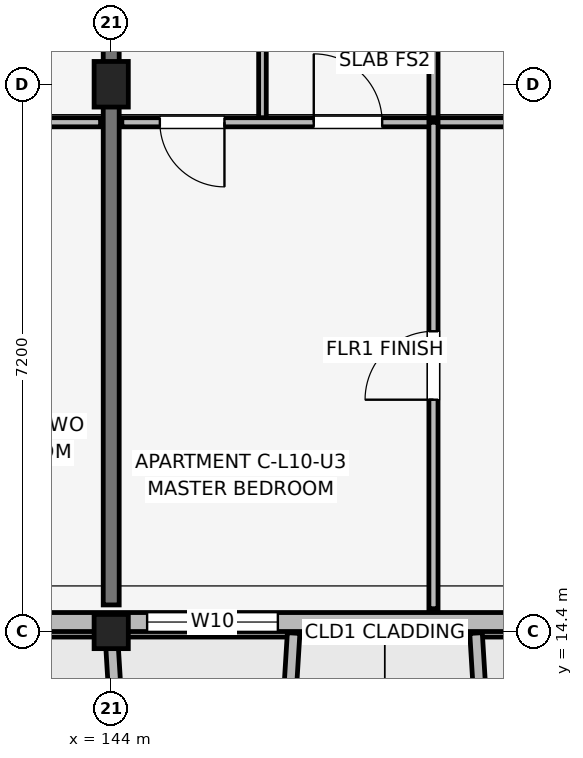
"""IFC4 building model, lengths in metres.
Left out: names, types, materials, properties, quantities, classifications, styles, units other than length and angle.
Written with IfcOpenShell. Run it as: python <this file> out.ifc"""

import sys

from ifc_helpers import new_model, si_unit, direction, frame, frame_2d, origin, origin_2d, place, context, subcontext, project, spatial, rectangle, extrude, element, fill, save


model = new_model("IFC4")
c1 = context("Model", 3, precision=1e-05, world=origin(), true_north=direction((0.0, 1.0)))
c2 = subcontext(c1, "Body", "Model", "MODEL_VIEW")
j1 = project(units=[si_unit("LENGTHUNIT", "METRE"), si_unit("PLANEANGLEUNIT", "RADIAN")], contexts=[c1])
p1 = place(None, origin())
s1 = spatial("IfcSite", under=j1, at=p1, CompositionType="ELEMENT")
p2 = place(p1, origin())
s2 = spatial("IfcBuilding", under=s1, at=p2, CompositionType="ELEMENT")
p3 = place(p2, frame((0.0, 0.0, 33.9)))
s3 = spatial("IfcBuildingStorey", under=s2, at=p3, CompositionType="ELEMENT", Elevation=33.9)
p4 = place(p3, frame((144.0, 14.4, 0.0), z_axis=(0.0, 0.0, 1.0), x_axis=(1.0, 0.0, 0.0)))
e1 = element("IfcColumn", 1, at=p4, inside=s3, PredefinedType="COLUMN", context=c2, shape_type="SweptSolid", body=[
    extrude(rectangle(XDim=0.45, YDim=0.45, at=origin_2d()), origin(), (0.0, 0.0, 1.0), 3.15),
])
p5 = place(p3, frame((144.0, 21.6, 0.0), z_axis=(0.0, 0.0, 1.0), x_axis=(1.0, 0.0, 0.0)))
e2 = element("IfcColumn", 2, at=p5, inside=s3, PredefinedType="COLUMN", context=c2, shape_type="SweptSolid", body=[
    extrude(rectangle(XDim=0.45, YDim=0.6, at=origin_2d()), origin(), (0.0, 0.0, 1.0), 3.15),
])
p6 = place(p3, frame((144.0, 14.75, 0.0), z_axis=(0.0, 0.0, 1.0), x_axis=(0.0, 1.0, 0.0)))
e3 = element("IfcWall", 3, at=p6, inside=s3, PredefinedType="SHEAR", context=c2, shape_type="SweptSolid", body=[
    extrude(rectangle(XDim=9.4, YDim=0.21, at=frame_2d((4.7, 0.0))), origin(), (0.0, 0.0, 1.0), 3.15),
])
p7 = place(p3, frame((132.6, 14.525, 0.0), z_axis=(0.0, 0.0, 1.0), x_axis=(1.0, 0.0, 0.0)))
e4 = element("IfcWall", 4, at=p7, inside=s3, PredefinedType="SOLIDWALL", context=c2, shape_type="SweptSolid", body=[
    extrude(rectangle(XDim=30.0, YDim=0.25, at=frame_2d((15.0, 0.0))), origin(), (0.0, 0.0, 1.0), 2.45),
])
p8 = place(p7, frame((8.55, 0.0, 0.0), z_axis=(0.0, 0.0, 1.0), x_axis=(-1.0, 0.0, 0.0)))
e5 = element("IfcOpeningElement", 5, at=p8, cuts=e4, PredefinedType="OPENING", context=c2, shape_type="SweptSolid", body=[
    extrude(rectangle(XDim=1.5, YDim=2.15, at=frame_2d((0.75, 1.075))), frame((0.0, 0.135, 0.0), z_axis=(0.0, -1.0, 0.0), x_axis=(1.0, 0.0, 0.0)), (0.0, 0.0, 1.0), 0.27),
])
p9 = place(p7, frame((23.1, 0.0, 0.0), z_axis=(0.0, 0.0, 1.0), x_axis=(-1.0, 0.0, 0.0)))
e6 = element("IfcOpeningElement", 6, at=p9, cuts=e4, PredefinedType="OPENING", context=c2, shape_type="SweptSolid", body=[
    extrude(rectangle(XDim=1.8, YDim=2.15, at=frame_2d((0.9, 1.075))), frame((0.0, 0.135, 0.0), z_axis=(0.0, -1.0, 0.0), x_axis=(1.0, 0.0, 0.0)), (0.0, 0.0, 1.0), 0.27),
])
p10 = place(p7, frame((2.567, 0.0, 0.75)))
e7 = element("IfcOpeningElement", 7, at=p10, cuts=e4, PredefinedType="OPENING", context=c2, shape_type="SweptSolid", body=[
    extrude(rectangle(XDim=1.22, YDim=1.5, at=frame_2d((0.61, 0.75))), frame((0.0, 0.135, 0.0), z_axis=(0.0, -1.0, 0.0), x_axis=(1.0, 0.0, 0.0)), (0.0, 0.0, 1.0), 0.27),
])
p11 = place(p7, frame((4.653, 0.0, 0.75)))
e8 = element("IfcOpeningElement", 8, at=p11, cuts=e4, PredefinedType="OPENING", context=c2, shape_type="SweptSolid", body=[
    extrude(rectangle(XDim=1.34, YDim=1.55, at=frame_2d((0.67, 0.775))), frame((0.0, 0.135, 0.0), z_axis=(0.0, -1.0, 0.0), x_axis=(1.0, 0.0, 0.0)), (0.0, 0.0, 1.0), 0.27),
])
p12 = place(p7, frame((11.873, 0.0, 0.7)))
e9 = element("IfcOpeningElement", 9, at=p12, cuts=e4, PredefinedType="OPENING", context=c2, shape_type="SweptSolid", body=[
    extrude(rectangle(XDim=1.72, YDim=1.6, at=frame_2d((0.86, 0.8))), frame((0.0, 0.135, 0.0), z_axis=(0.0, -1.0, 0.0), x_axis=(1.0, 0.0, 0.0)), (0.0, 0.0, 1.0), 0.27),
])
p13 = place(p7, frame((16.968, 0.0, 0.75)))
e10 = element("IfcOpeningElement", 10, at=p13, cuts=e4, PredefinedType="OPENING", context=c2, shape_type="SweptSolid", body=[
    extrude(rectangle(XDim=0.6, YDim=1.25, at=frame_2d((0.3, 0.625))), frame((0.0, 0.135, 0.0), z_axis=(0.0, -1.0, 0.0), x_axis=(1.0, 0.0, 0.0)), (0.0, 0.0, 1.0), 0.27),
])
p14 = place(p7, frame((19.488, 0.0, 0.75)))
e11 = element("IfcOpeningElement", 11, at=p14, cuts=e4, PredefinedType="OPENING", context=c2, shape_type="SweptSolid", body=[
    extrude(rectangle(XDim=0.72, YDim=1.35, at=frame_2d((0.36, 0.675))), frame((0.0, 0.135, 0.0), z_axis=(0.0, -1.0, 0.0), x_axis=(1.0, 0.0, 0.0)), (0.0, 0.0, 1.0), 0.27),
])
p15 = place(p7, frame((26.528, 0.0, 0.75)))
e12 = element("IfcOpeningElement", 12, at=p15, cuts=e4, PredefinedType="OPENING", context=c2, shape_type="SweptSolid", body=[
    extrude(rectangle(XDim=0.85, YDim=1.4, at=frame_2d((0.425, 0.7))), frame((0.0, 0.135, 0.0), z_axis=(0.0, -1.0, 0.0), x_axis=(1.0, 0.0, 0.0)), (0.0, 0.0, 1.0), 0.27),
])
p16 = place(p7, frame((28.525, 0.0, 0.75)))
e13 = element("IfcOpeningElement", 13, at=p16, cuts=e4, PredefinedType="OPENING", context=c2, shape_type="SweptSolid", body=[
    extrude(rectangle(XDim=0.98, YDim=1.45, at=frame_2d((0.49, 0.725))), frame((0.0, 0.135, 0.0), z_axis=(0.0, -1.0, 0.0), x_axis=(1.0, 0.0, 0.0)), (0.0, 0.0, 1.0), 0.27),
])
for number, where, z_axis, x_axis in (
    (14, (144.0, 14.38, 0.0), (0.0, 0.0, 1.0), (0.061, -0.998, 0.0)),
    (15, (146.4, 14.38, 0.0), (0.0, 0.0, 1.0), (-0.061, -0.998, 0.0)),
    (16, (148.8, 14.38, 0.0), (0.0, 0.0, 1.0), (0.061, -0.998, 0.0)),
):
    element("IfcWall", number, at=place(p3, frame(where, z_axis=z_axis, x_axis=x_axis)), inside=s3, PredefinedType="ELEMENTEDWALL", context=c2, shape_type="SweptSolid", body=[
        extrude(rectangle(XDim=1.964, YDim=0.165, at=frame_2d((0.982, 0.0))), origin(), (0.0, 0.0, 1.0), 2.58),
    ])
p17 = place(p3, frame((136.94, 21.1, 0.0), z_axis=(0.0, 0.0, 1.0), x_axis=(1.0, 0.0, 0.0)))
e17 = element("IfcWall", 17, at=p17, inside=s3, PredefinedType="PARTITIONING", context=c2, shape_type="SweptSolid", body=[
    extrude(rectangle(XDim=6.92, YDim=0.12, at=frame_2d((3.46, 0.0))), origin(), (0.0, 0.0, 1.0), 2.38),
])
p18 = place(p17, frame((0.5, 0.0, 0.0)))
e18 = element("IfcOpeningElement", 18, at=p18, cuts=e17, PredefinedType="OPENING", context=c2, shape_type="SweptSolid", body=[
    extrude(rectangle(XDim=0.85, YDim=2.08, at=frame_2d((0.425, 1.04))), frame((0.0, 0.07, 0.0), z_axis=(0.0, -1.0, 0.0), x_axis=(1.0, 0.0, 0.0)), (0.0, 0.0, 1.0), 0.14),
])
p19 = place(p17, frame((3.275, 0.0, 0.0), z_axis=(0.0, 0.0, 1.0), x_axis=(-1.0, 0.0, 0.0)))
e19 = element("IfcOpeningElement", 19, at=p19, cuts=e17, PredefinedType="OPENING", context=c2, shape_type="SweptSolid", body=[
    extrude(rectangle(XDim=0.9, YDim=2.08, at=frame_2d((0.45, 1.04))), frame((0.0, 0.07, 0.0), z_axis=(0.0, -1.0, 0.0), x_axis=(1.0, 0.0, 0.0)), (0.0, 0.0, 1.0), 0.14),
])
p20 = place(p17, frame((4.885, 0.0, 0.0)))
e20 = element("IfcOpeningElement", 20, at=p20, cuts=e17, PredefinedType="OPENING", context=c2, shape_type="SweptSolid", body=[
    extrude(rectangle(XDim=0.95, YDim=2.08, at=frame_2d((0.475, 1.04))), frame((0.0, 0.07, 0.0), z_axis=(0.0, -1.0, 0.0), x_axis=(1.0, 0.0, 0.0)), (0.0, 0.0, 1.0), 0.14),
])
p21 = place(p3, frame((145.99, 21.1, 0.0), z_axis=(0.0, 0.0, 1.0), x_axis=(0.0, 1.0, 0.0)))
e21 = element("IfcWall", 21, at=p21, inside=s3, PredefinedType="PARTITIONING", context=c2, shape_type="SweptSolid", body=[
    extrude(rectangle(XDim=3.2, YDim=0.1, at=frame_2d((1.6, 0.0))), origin(), (0.0, 0.0, 1.0), 2.38),
])
p22 = place(p3, frame((148.24, 21.1, 0.0), z_axis=(0.0, 0.0, 1.0), x_axis=(0.0, 1.0, 0.0)))
e22 = element("IfcWall", 22, at=p22, inside=s3, PredefinedType="PARTITIONING", context=c2, shape_type="SweptSolid", body=[
    extrude(rectangle(XDim=3.2, YDim=0.12, at=frame_2d((1.6, 0.0))), origin(), (0.0, 0.0, 1.0), 2.38),
])
p23 = place(p3, frame((144.14, 21.1, 0.0), z_axis=(0.0, 0.0, 1.0), x_axis=(1.0, 0.0, 0.0)))
e23 = element("IfcWall", 23, at=p23, inside=s3, PredefinedType="PARTITIONING", context=c2, shape_type="SweptSolid", body=[
    extrude(rectangle(XDim=6.92, YDim=0.12, at=frame_2d((3.46, 0.0))), origin(), (0.0, 0.0, 1.0), 2.38),
])
p24 = place(p23, frame((1.35, 0.0, 0.0), z_axis=(0.0, 0.0, 1.0), x_axis=(-1.0, 0.0, 0.0)))
e24 = element("IfcOpeningElement", 24, at=p24, cuts=e23, PredefinedType="OPENING", context=c2, shape_type="SweptSolid", body=[
    extrude(rectangle(XDim=0.85, YDim=2.08, at=frame_2d((0.425, 1.04))), frame((0.0, 0.07, 0.0), z_axis=(0.0, -1.0, 0.0), x_axis=(1.0, 0.0, 0.0)), (0.0, 0.0, 1.0), 0.14),
])
p25 = place(p23, frame((2.525, 0.0, 0.0)))
e25 = element("IfcOpeningElement", 25, at=p25, cuts=e23, PredefinedType="OPENING", context=c2, shape_type="SweptSolid", body=[
    extrude(rectangle(XDim=0.9, YDim=2.08, at=frame_2d((0.45, 1.04))), frame((0.0, 0.07, 0.0), z_axis=(0.0, -1.0, 0.0), x_axis=(1.0, 0.0, 0.0)), (0.0, 0.0, 1.0), 0.14),
])
p26 = place(p23, frame((5.985, 0.0, 0.0), z_axis=(0.0, 0.0, 1.0), x_axis=(-1.0, 0.0, 0.0)))
e26 = element("IfcOpeningElement", 26, at=p26, cuts=e23, PredefinedType="OPENING", context=c2, shape_type="SweptSolid", body=[
    extrude(rectangle(XDim=0.95, YDim=2.08, at=frame_2d((0.475, 1.04))), frame((0.0, 0.07, 0.0), z_axis=(0.0, -1.0, 0.0), x_axis=(1.0, 0.0, 0.0)), (0.0, 0.0, 1.0), 0.14),
])
p27 = place(p3, frame((148.24, 14.7, 0.0), z_axis=(0.0, 0.0, 1.0), x_axis=(0.0, 1.0, 0.0)))
e27 = element("IfcWall", 27, at=p27, inside=s3, PredefinedType="PARTITIONING", context=c2, shape_type="SweptSolid", body=[
    extrude(rectangle(XDim=6.4, YDim=0.12, at=frame_2d((3.2, 0.0))), origin(), (0.0, 0.0, 1.0), 2.38),
])
p28 = place(p27, frame((2.75, 0.0, 0.0)))
e28 = element("IfcOpeningElement", 28, at=p28, cuts=e27, PredefinedType="OPENING", context=c2, shape_type="SweptSolid", body=[
    extrude(rectangle(XDim=0.9, YDim=2.08, at=frame_2d((0.45, 1.04))), frame((0.0, 0.07, 0.0), z_axis=(0.0, -1.0, 0.0), x_axis=(1.0, 0.0, 0.0)), (0.0, 0.0, 1.0), 0.14),
])
p29 = place(p12, origin())
e29 = element("IfcWindow", 29, at=p29, inside=s3, PartitioningType="SINGLE_PANEL", PredefinedType="WINDOW", context=c2, shape_type="SweptSolid", body=[
    extrude(rectangle(XDim=1.72, YDim=1.6, at=frame_2d((0.86, 0.8))), frame((0.0, 0.03, 0.0), z_axis=(0.0, -1.0, 0.0), x_axis=(1.0, 0.0, 0.0)), (0.0, 0.0, 1.0), 0.06),
])
fill(e9, e29)
p30 = place(p24, origin())
e30 = element("IfcDoor", 30, at=p30, inside=s3, OperationType="SINGLE_SWING_RIGHT", PredefinedType="DOOR", context=c2, shape_type="SweptSolid", body=[
    extrude(rectangle(XDim=0.85, YDim=2.08, at=frame_2d((0.425, 1.04))), frame((0.0, 0.025, 0.0), z_axis=(0.0, -1.0, 0.0), x_axis=(1.0, 0.0, 0.0)), (0.0, 0.0, 1.0), 0.05),
])
fill(e24, e30)
p31 = place(p25, origin())
e31 = element("IfcDoor", 31, at=p31, inside=s3, OperationType="SINGLE_SWING_LEFT", PredefinedType="DOOR", context=c2, shape_type="SweptSolid", body=[
    extrude(rectangle(XDim=0.9, YDim=2.08, at=frame_2d((0.45, 1.04))), frame((0.0, 0.025, 0.0), z_axis=(0.0, -1.0, 0.0), x_axis=(1.0, 0.0, 0.0)), (0.0, 0.0, 1.0), 0.05),
])
fill(e25, e31)
p32 = place(p28, origin())
e32 = element("IfcDoor", 32, at=p32, inside=s3, OperationType="SINGLE_SWING_LEFT", PredefinedType="DOOR", context=c2, shape_type="SweptSolid", body=[
    extrude(rectangle(XDim=0.9, YDim=2.08, at=frame_2d((0.45, 1.04))), frame((0.0, 0.025, 0.0), z_axis=(0.0, -1.0, 0.0), x_axis=(1.0, 0.0, 0.0)), (0.0, 0.0, 1.0), 0.05),
])
fill(e28, e32)
save(model, sys.argv[1])
